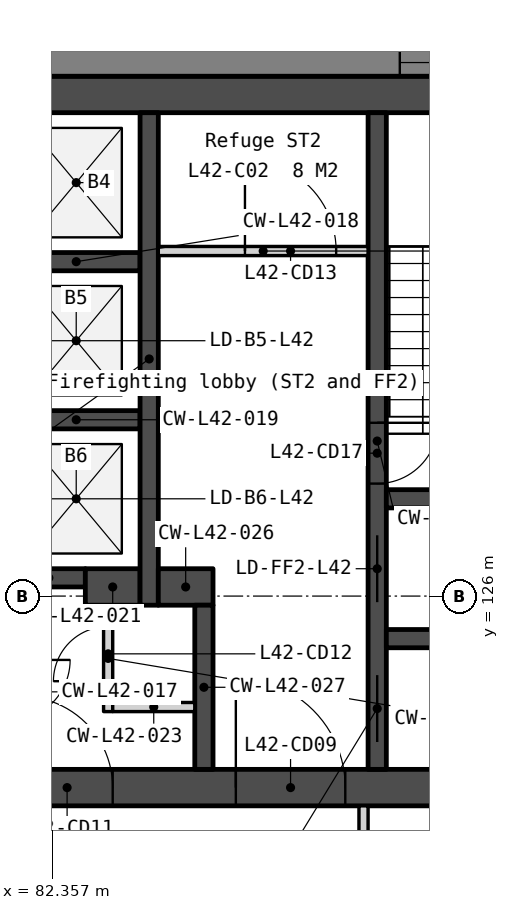
"""IFC4 building model, lengths in metres.
Left out: names, types, materials, properties, quantities, classifications, styles, units other than length and angle.
Written with IfcOpenShell. Run it as: python <this file> out.ifc"""

import sys

from ifc_helpers import new_model, si_unit, direction, frame, frame_2d, origin, place, context, subcontext, project, spatial, polyline, rectangle, outline, extrude, element, fill, save


model = new_model("IFC4")
c1 = context("Model", 3, precision=1e-05, world=origin(), true_north=direction((0.0, 1.0)))
c2 = subcontext(c1, "Body", "Model", "MODEL_VIEW")
j1 = project(units=[si_unit("LENGTHUNIT", "METRE"), si_unit("PLANEANGLEUNIT", "RADIAN")], contexts=[c1])
p1 = place(None, origin())
s1 = spatial("IfcSite", under=j1, at=p1, CompositionType="ELEMENT")
p2 = place(p1, origin())
s2 = spatial("IfcBuilding", under=s1, at=p2, CompositionType="ELEMENT")
p3 = place(p2, frame((0.0, 0.0, 167.6)))
s3 = spatial("IfcBuildingStorey", under=s2, at=p3, CompositionType="ELEMENT", Elevation=167.6)
p4 = place(p3, frame((69.0, 134.25, 0.0), z_axis=(0.0, 0.0, 1.0), x_axis=(1.0, 0.0, 0.0)))
e1 = element("IfcWall", 1, at=p4, inside=s3, PredefinedType="SOLIDWALL", context=c2, shape_type="SweptSolid", body=[
    extrude(rectangle(XDim=22.0, YDim=0.6, at=frame_2d((11.0, 0.0))), origin(), (0.0, 0.0, 1.0), 3.75),
])
p5 = place(p3, frame((69.0, 122.85, 0.0), z_axis=(0.0, 0.0, 1.0), x_axis=(1.0, 0.0, 0.0)))
e2 = element("IfcWall", 2, at=p5, inside=s3, PredefinedType="SOLIDWALL", context=c2, shape_type="SweptSolid", body=[
    extrude(rectangle(XDim=22.0, YDim=0.6, at=frame_2d((11.0, 0.0))), origin(), (0.0, 0.0, 1.0), 3.75),
])
p6 = place(p5, frame((16.375, 0.0, 0.0)))
e3 = element("IfcOpeningElement", 3, at=p6, cuts=e2, PredefinedType="OPENING", context=c2, shape_type="SweptSolid", body=[
    extrude(rectangle(XDim=1.8, YDim=2.1, at=frame_2d((0.9, 1.05))), frame((0.0, 0.31, 0.0), z_axis=(0.0, -1.0, 0.0), x_axis=(1.0, 0.0, 0.0)), (0.0, 0.0, 1.0), 0.62),
])
p7 = place(p5, frame((3.825, 0.0, 0.0)))
e4 = element("IfcOpeningElement", 4, at=p7, cuts=e2, PredefinedType="OPENING", context=c2, shape_type="SweptSolid", body=[
    extrude(rectangle(XDim=1.8, YDim=2.1, at=frame_2d((0.9, 1.05))), frame((0.0, 0.31, 0.0), z_axis=(0.0, -1.0, 0.0), x_axis=(1.0, 0.0, 0.0)), (0.0, 0.0, 1.0), 0.62),
])
p8 = place(p5, frame((12.85, 0.0, 0.0)))
e5 = element("IfcOpeningElement", 5, at=p8, cuts=e2, PredefinedType="OPENING", context=c2, shape_type="SweptSolid", body=[
    extrude(rectangle(XDim=1.5, YDim=2.1, at=frame_2d((0.75, 1.05))), frame((0.0, 0.31, 0.0), z_axis=(0.0, -1.0, 0.0), x_axis=(1.0, 0.0, 0.0)), (0.0, 0.0, 1.0), 0.62),
])
for number, where, z_axis, x_axis in (
    (6, (81.7, 131.5, 0.0), (0.0, 0.0, 1.0), (1.0, 0.0, 0.0)),
    (7, (81.7, 128.9, 0.0), (0.0, 0.0, 1.0), (1.0, 0.0, 0.0)),
):
    element("IfcWall", number, at=place(p3, frame(where, z_axis=z_axis, x_axis=x_axis)), inside=s3, PredefinedType="SOLIDWALL", context=c2, shape_type="SweptSolid", body=[
        extrude(rectangle(XDim=2.1, YDim=0.3, at=frame_2d((1.05, 0.0))), origin(), (0.0, 0.0, 1.0), 3.75),
    ])
p9 = place(p3, frame((81.7, 126.3, 0.0), z_axis=(0.0, 0.0, 1.0), x_axis=(1.0, 0.0, 0.0)))
e8 = element("IfcWall", 8, at=p9, inside=s3, PredefinedType="SOLIDWALL", context=c2, shape_type="SweptSolid", body=[
    extrude(rectangle(XDim=1.2, YDim=0.3, at=frame_2d((0.6, 0.0))), origin(), (0.0, 0.0, 1.0), 3.75),
])
p10 = place(p3, frame((82.9, 126.15, 0.0), z_axis=(0.0, 0.0, 1.0), x_axis=(1.0, 0.0, 0.0)))
e9 = element("IfcWall", 9, at=p10, inside=s3, PredefinedType="SOLIDWALL", context=c2, shape_type="SweptSolid", body=[
    extrude(rectangle(XDim=0.9, YDim=0.6, at=frame_2d((0.45, 0.0))), origin(), (0.0, 0.0, 1.0), 3.75),
])
p11 = place(p3, frame((83.275, 125.85, 0.0), z_axis=(0.0, 0.0, 1.0), x_axis=(0.0, -1.0, 0.0)))
e10 = element("IfcWall", 10, at=p11, inside=s3, PredefinedType="PARTITIONING", context=c2, shape_type="SweptSolid", body=[
    extrude(rectangle(XDim=1.75, YDim=0.15, at=frame_2d((0.875, 0.0))), origin(), (0.0, 0.0, 1.0), 3.75),
])
p12 = place(p11, frame((0.35, 0.0, 0.0)))
e11 = element("IfcOpeningElement", 11, at=p12, cuts=e10, PredefinedType="OPENING", context=c2, shape_type="SweptSolid", body=[
    extrude(rectangle(XDim=0.9, YDim=2.1, at=frame_2d((0.45, 1.05))), frame((0.0, 0.085, 0.0), z_axis=(0.0, -1.0, 0.0), x_axis=(1.0, 0.0, 0.0)), (0.0, 0.0, 1.0), 0.17),
])
p13 = place(p3, frame((83.35, 124.175, 0.0), z_axis=(0.0, 0.0, 1.0), x_axis=(1.0, 0.0, 0.0)))
e12 = element("IfcWall", 12, at=p13, inside=s3, PredefinedType="PARTITIONING", context=c2, shape_type="SweptSolid", body=[
    extrude(rectangle(XDim=1.35, YDim=0.15, at=frame_2d((0.675, 0.0))), origin(), (0.0, 0.0, 1.0), 3.75),
])
p14 = place(p3, frame((83.95, 133.95, 0.0), z_axis=(0.0, 0.0, 1.0), x_axis=(0.0, -1.0, 0.0)))
e13 = element("IfcWall", 13, at=p14, inside=s3, PredefinedType="SOLIDWALL", context=c2, shape_type="SweptSolid", body=[
    extrude(rectangle(XDim=8.1, YDim=0.3, at=frame_2d((4.05, 0.0))), origin(), (0.0, 0.0, 1.0), 3.75),
])
p15 = place(p3, frame((84.1, 131.675, 0.0), z_axis=(0.0, 0.0, 1.0), x_axis=(1.0, 0.0, 0.0)))
e14 = element("IfcWall", 14, at=p15, inside=s3, PredefinedType="PARTITIONING", context=c2, shape_type="SweptSolid", body=[
    extrude(rectangle(XDim=3.45, YDim=0.15, at=frame_2d((1.725, 0.0))), origin(), (0.0, 0.0, 1.0), 3.75),
])
p16 = place(p15, frame((1.425, 0.0, 0.0)))
e15 = element("IfcOpeningElement", 15, at=p16, cuts=e14, PredefinedType="OPENING", context=c2, shape_type="SweptSolid", body=[
    extrude(rectangle(XDim=1.5, YDim=2.1, at=frame_2d((0.75, 1.05))), frame((0.0, 0.085, 0.0), z_axis=(0.0, -1.0, 0.0), x_axis=(1.0, 0.0, 0.0)), (0.0, 0.0, 1.0), 0.17),
])
p17 = place(p3, frame((84.1, 126.15, 0.0), z_axis=(0.0, 0.0, 1.0), x_axis=(1.0, 0.0, 0.0)))
e16 = element("IfcWall", 16, at=p17, inside=s3, PredefinedType="SOLIDWALL", context=c2, shape_type="SweptSolid", body=[
    extrude(rectangle(XDim=0.9, YDim=0.6, at=frame_2d((0.45, 0.0))), origin(), (0.0, 0.0, 1.0), 3.75),
])
p18 = place(p3, frame((84.85, 125.85, 0.0), z_axis=(0.0, 0.0, 1.0), x_axis=(0.0, -1.0, 0.0)))
e17 = element("IfcWall", 17, at=p18, inside=s3, PredefinedType="SOLIDWALL", context=c2, shape_type="SweptSolid", body=[
    extrude(rectangle(XDim=2.7, YDim=0.3, at=frame_2d((1.35, 0.0))), origin(), (0.0, 0.0, 1.0), 3.75),
])
p19 = place(p3, frame((87.7, 133.95, 0.0), z_axis=(0.0, 0.0, 1.0), x_axis=(0.0, -1.0, 0.0)))
e18 = element("IfcWall", 18, at=p19, inside=s3, PredefinedType="SOLIDWALL", context=c2, shape_type="SweptSolid", body=[
    extrude(rectangle(XDim=10.8, YDim=0.3, at=frame_2d((5.4, 0.0))), origin(), (0.0, 0.0, 1.0), 3.75),
])
p20 = place(p19, frame((6.95, 0.0, 0.0)))
e19 = element("IfcOpeningElement", 19, at=p20, cuts=e18, PredefinedType="OPENING", context=c2, shape_type="SweptSolid", body=[
    extrude(rectangle(XDim=1.1, YDim=2.1, at=frame_2d((0.55, 1.05))), frame((0.0, 0.16, 0.0), z_axis=(0.0, -1.0, 0.0), x_axis=(1.0, 0.0, 0.0)), (0.0, 0.0, 1.0), 0.32),
])
p21 = place(p19, frame((5.1, 0.0, 0.0)))
e20 = element("IfcOpeningElement", 20, at=p21, cuts=e18, PredefinedType="OPENING", context=c2, shape_type="SweptSolid", body=[
    extrude(rectangle(XDim=1.0, YDim=2.1, at=frame_2d((0.5, 1.05))), frame((0.0, 0.16, 0.0), z_axis=(0.0, -1.0, 0.0), x_axis=(1.0, 0.0, 0.0)), (0.0, 0.0, 1.0), 0.32),
])
p22 = place(p19, frame((9.25, 0.0, 0.0)))
e21 = element("IfcOpeningElement", 21, at=p22, cuts=e18, PredefinedType="OPENING", context=c2, shape_type="SweptSolid", body=[
    extrude(rectangle(XDim=1.1, YDim=2.1, at=frame_2d((0.55, 1.05))), frame((0.0, 0.16, 0.0), z_axis=(0.0, -1.0, 0.0), x_axis=(1.0, 0.0, 0.0)), (0.0, 0.0, 1.0), 0.32),
])
for number, where, z_axis, x_axis in (
    (22, (87.85, 127.6, 0.0), (0.0, 0.0, 1.0), (1.0, 0.0, 0.0)),
    (23, (87.85, 125.3, 0.0), (0.0, 0.0, 1.0), (1.0, 0.0, 0.0)),
):
    element("IfcWall", number, at=place(p3, frame(where, z_axis=z_axis, x_axis=x_axis)), inside=s3, PredefinedType="SOLIDWALL", context=c2, shape_type="SweptSolid", body=[
        extrude(rectangle(XDim=2.55, YDim=0.3, at=frame_2d((1.275, 0.0))), origin(), (0.0, 0.0, 1.0), 3.75),
    ])
p23 = place(p3, frame((100.243, 134.775, -0.15), z_axis=(0.0, 0.0, 1.0), x_axis=(-1.0, 0.0, 0.0)))
e24 = element("IfcWall", 24, at=p23, inside=s3, PredefinedType="SOLIDWALL", context=c2, shape_type="SweptSolid", body=[
    extrude(outline(polyline([(40.486, 0.0), (40.486, 3.9), (0.0, 3.9), (0.0, 0.0), (40.486, 0.0)])), frame((0.0, 0.225, 0.0), z_axis=(0.0, -1.0, 0.0), x_axis=(1.0, 0.0, 0.0)), (0.0, 0.0, 1.0), 0.45),
])
p24 = place(p23, frame((0.87, 0.0, 0.95)))
e25 = element("IfcOpeningElement", 25, at=p24, cuts=e24, PredefinedType="OPENING", context=c2, shape_type="SweptSolid", body=[
    extrude(rectangle(XDim=1.2, YDim=2.2, at=frame_2d((0.6, 1.1))), frame((0.0, 0.235, 0.0), z_axis=(0.0, -1.0, 0.0), x_axis=(1.0, 0.0, 0.0)), (0.0, 0.0, 1.0), 0.47),
])
p25 = place(p23, frame((8.072, 0.0, 0.95)))
e26 = element("IfcOpeningElement", 26, at=p25, cuts=e24, PredefinedType="OPENING", context=c2, shape_type="SweptSolid", body=[
    extrude(rectangle(XDim=1.8, YDim=2.2, at=frame_2d((0.9, 1.1))), frame((0.0, 0.235, 0.0), z_axis=(0.0, -1.0, 0.0), x_axis=(1.0, 0.0, 0.0)), (0.0, 0.0, 1.0), 0.47),
])
p26 = place(p23, frame((10.372, 0.0, 0.95)))
e27 = element("IfcOpeningElement", 27, at=p26, cuts=e24, PredefinedType="OPENING", context=c2, shape_type="SweptSolid", body=[
    extrude(rectangle(XDim=1.8, YDim=2.2, at=frame_2d((0.9, 1.1))), frame((0.0, 0.235, 0.0), z_axis=(0.0, -1.0, 0.0), x_axis=(1.0, 0.0, 0.0)), (0.0, 0.0, 1.0), 0.47),
])
p27 = place(p23, frame((18.193, 0.0, 0.95)))
e28 = element("IfcOpeningElement", 28, at=p27, cuts=e24, PredefinedType="OPENING", context=c2, shape_type="SweptSolid", body=[
    extrude(rectangle(XDim=1.8, YDim=2.2, at=frame_2d((0.9, 1.1))), frame((0.0, 0.235, 0.0), z_axis=(0.0, -1.0, 0.0), x_axis=(1.0, 0.0, 0.0)), (0.0, 0.0, 1.0), 0.47),
])
p28 = place(p23, frame((20.493, 0.0, 0.95)))
e29 = element("IfcOpeningElement", 29, at=p28, cuts=e24, PredefinedType="OPENING", context=c2, shape_type="SweptSolid", body=[
    extrude(rectangle(XDim=1.8, YDim=2.2, at=frame_2d((0.9, 1.1))), frame((0.0, 0.235, 0.0), z_axis=(0.0, -1.0, 0.0), x_axis=(1.0, 0.0, 0.0)), (0.0, 0.0, 1.0), 0.47),
])
p29 = place(p23, frame((28.315, 0.0, 0.95)))
e30 = element("IfcOpeningElement", 30, at=p29, cuts=e24, PredefinedType="OPENING", context=c2, shape_type="SweptSolid", body=[
    extrude(rectangle(XDim=1.8, YDim=2.2, at=frame_2d((0.9, 1.1))), frame((0.0, 0.235, 0.0), z_axis=(0.0, -1.0, 0.0), x_axis=(1.0, 0.0, 0.0)), (0.0, 0.0, 1.0), 0.47),
])
p30 = place(p23, frame((30.615, 0.0, 0.95)))
e31 = element("IfcOpeningElement", 31, at=p30, cuts=e24, PredefinedType="OPENING", context=c2, shape_type="SweptSolid", body=[
    extrude(rectangle(XDim=1.8, YDim=2.2, at=frame_2d((0.9, 1.1))), frame((0.0, 0.235, 0.0), z_axis=(0.0, -1.0, 0.0), x_axis=(1.0, 0.0, 0.0)), (0.0, 0.0, 1.0), 0.47),
])
p31 = place(p23, frame((38.417, 0.0, 0.95)))
e32 = element("IfcOpeningElement", 32, at=p31, cuts=e24, PredefinedType="OPENING", context=c2, shape_type="SweptSolid", body=[
    extrude(rectangle(XDim=1.2, YDim=2.2, at=frame_2d((0.6, 1.1))), frame((0.0, 0.235, 0.0), z_axis=(0.0, -1.0, 0.0), x_axis=(1.0, 0.0, 0.0)), (0.0, 0.0, 1.0), 0.47),
])
p32 = place(p3, frame((88.166, 106.564, -0.15), z_axis=(0.0, 0.0, 1.0), x_axis=(0.499995644604, 0.866027918359, 0.0)))
e33 = element("IfcWall", 33, at=p32, inside=s3, PredefinedType="SOLIDWALL", context=c2, shape_type="SweptSolid", body=[
    extrude(outline(polyline([(28.365, 3.9), (28.365, 0.0), (0.0, 0.0), (0.0, 3.9), (28.365, 3.9)])), frame((0.0, 0.225, 0.0), z_axis=(0.0, -1.0, 0.0), x_axis=(1.0, 0.0, 0.0)), (0.0, 0.0, 1.0), 0.45),
])
p33 = place(p32, frame((6.072, 0.0, 0.95)))
e34 = element("IfcOpeningElement", 34, at=p33, cuts=e33, PredefinedType="OPENING", context=c2, shape_type="SweptSolid", body=[
    extrude(rectangle(XDim=1.8, YDim=2.2, at=frame_2d((0.9, 1.1))), frame((0.0, 0.235, 0.0), z_axis=(0.0, -1.0, 0.0), x_axis=(1.0, 0.0, 0.0)), (0.0, 0.0, 1.0), 0.47),
])
p34 = place(p32, frame((8.372, 0.0, 0.95)))
e35 = element("IfcOpeningElement", 35, at=p34, cuts=e33, PredefinedType="OPENING", context=c2, shape_type="SweptSolid", body=[
    extrude(rectangle(XDim=1.8, YDim=2.2, at=frame_2d((0.9, 1.1))), frame((0.0, 0.235, 0.0), z_axis=(0.0, -1.0, 0.0), x_axis=(1.0, 0.0, 0.0)), (0.0, 0.0, 1.0), 0.47),
])
p35 = place(p32, frame((16.193, 0.0, 0.95)))
e36 = element("IfcOpeningElement", 36, at=p35, cuts=e33, PredefinedType="OPENING", context=c2, shape_type="SweptSolid", body=[
    extrude(rectangle(XDim=1.8, YDim=2.2, at=frame_2d((0.9, 1.1))), frame((0.0, 0.235, 0.0), z_axis=(0.0, -1.0, 0.0), x_axis=(1.0, 0.0, 0.0)), (0.0, 0.0, 1.0), 0.47),
])
p36 = place(p32, frame((18.493, 0.0, 0.95)))
e37 = element("IfcOpeningElement", 37, at=p36, cuts=e33, PredefinedType="OPENING", context=c2, shape_type="SweptSolid", body=[
    extrude(rectangle(XDim=1.8, YDim=2.2, at=frame_2d((0.9, 1.1))), frame((0.0, 0.235, 0.0), z_axis=(0.0, -1.0, 0.0), x_axis=(1.0, 0.0, 0.0)), (0.0, 0.0, 1.0), 0.47),
])
p37 = place(p32, frame((26.295, 0.0, 0.95)))
e38 = element("IfcOpeningElement", 38, at=p37, cuts=e33, PredefinedType="OPENING", context=c2, shape_type="SweptSolid", body=[
    extrude(rectangle(XDim=1.2, YDim=2.2, at=frame_2d((0.6, 1.1))), frame((0.0, 0.235, 0.0), z_axis=(0.0, -1.0, 0.0), x_axis=(1.0, 0.0, 0.0)), (0.0, 0.0, 1.0), 0.47),
])
p38 = place(p3, frame((87.475, 120.05, 0.0), z_axis=(0.0, 0.0, 1.0), x_axis=(0.0, 1.0, 0.0)))
e39 = element("IfcWall", 39, at=p38, inside=s3, PredefinedType="PARTITIONING", context=c2, shape_type="SweptSolid", body=[
    extrude(rectangle(XDim=2.5, YDim=0.15, at=frame_2d((1.25, 0.0))), origin(), (0.0, 0.0, 1.0), 3.75),
])
p39 = place(p38, frame((0.75, 0.0, 0.0)))
e40 = element("IfcOpeningElement", 40, at=p39, cuts=e39, PredefinedType="OPENING", context=c2, shape_type="SweptSolid", body=[
    extrude(rectangle(XDim=1.0, YDim=2.1, at=frame_2d((0.5, 1.05))), frame((0.0, 0.085, 0.0), z_axis=(0.0, -1.0, 0.0), x_axis=(1.0, 0.0, 0.0)), (0.0, 0.0, 1.0), 0.17),
])
p40 = place(p20, origin())
e41 = element("IfcDoor", 41, at=p40, inside=s3, OperationType="SLIDING_TO_LEFT", PredefinedType="DOOR", context=c2, shape_type="SweptSolid", body=[
    extrude(rectangle(XDim=1.1, YDim=2.1, at=frame_2d((0.55, 1.05))), frame((0.0, 0.025, 0.0), z_axis=(0.0, -1.0, 0.0), x_axis=(1.0, 0.0, 0.0)), (0.0, 0.0, 1.0), 0.05),
])
fill(e19, e41)
p41 = place(p6, origin())
e42 = element("IfcDoor", 42, at=p41, inside=s3, OperationType="DOUBLE_DOOR_DOUBLE_SWING", PredefinedType="DOOR", context=c2, shape_type="SweptSolid", body=[
    extrude(rectangle(XDim=1.8, YDim=2.1, at=frame_2d((0.9, 1.05))), frame((0.0, 0.025, 0.0), z_axis=(0.0, -1.0, 0.0), x_axis=(1.0, 0.0, 0.0)), (0.0, 0.0, 1.0), 0.05),
])
fill(e3, e42)
p42 = place(p8, origin())
e43 = element("IfcDoor", 43, at=p42, inside=s3, OperationType="DOUBLE_DOOR_DOUBLE_SWING", PredefinedType="DOOR", context=c2, shape_type="SweptSolid", body=[
    extrude(rectangle(XDim=1.5, YDim=2.1, at=frame_2d((0.75, 1.05))), frame((0.0, 0.025, 0.0), z_axis=(0.0, -1.0, 0.0), x_axis=(1.0, 0.0, 0.0)), (0.0, 0.0, 1.0), 0.05),
])
fill(e5, e43)
p43 = place(p12, origin())
e44 = element("IfcDoor", 44, at=p43, inside=s3, OperationType="SINGLE_SWING_RIGHT", PredefinedType="DOOR", context=c2, shape_type="SweptSolid", body=[
    extrude(rectangle(XDim=0.9, YDim=2.1, at=frame_2d((0.45, 1.05))), frame((0.0, 0.025, 0.0), z_axis=(0.0, -1.0, 0.0), x_axis=(1.0, 0.0, 0.0)), (0.0, 0.0, 1.0), 0.05),
])
fill(e11, e44)
p44 = place(p16, origin())
e45 = element("IfcDoor", 45, at=p44, inside=s3, OperationType="DOUBLE_DOOR_DOUBLE_SWING", PredefinedType="DOOR", context=c2, shape_type="SweptSolid", body=[
    extrude(rectangle(XDim=1.5, YDim=2.1, at=frame_2d((0.75, 1.05))), frame((0.0, 0.025, 0.0), z_axis=(0.0, -1.0, 0.0), x_axis=(1.0, 0.0, 0.0)), (0.0, 0.0, 1.0), 0.05),
])
fill(e15, e45)
p45 = place(p21, origin())
e46 = element("IfcDoor", 46, at=p45, inside=s3, OperationType="SINGLE_SWING_LEFT", PredefinedType="DOOR", context=c2, shape_type="SweptSolid", body=[
    extrude(rectangle(XDim=1.0, YDim=2.1, at=frame_2d((0.5, 1.05))), frame((0.0, 0.025, 0.0), z_axis=(0.0, -1.0, 0.0), x_axis=(1.0, 0.0, 0.0)), (0.0, 0.0, 1.0), 0.05),
])
fill(e20, e46)
p46 = place(p22, origin())
e47 = element("IfcDoor", 47, at=p46, inside=s3, OperationType="SLIDING_TO_LEFT", PredefinedType="DOOR", context=c2, shape_type="SweptSolid", body=[
    extrude(rectangle(XDim=1.1, YDim=2.1, at=frame_2d((0.55, 1.05))), frame((0.0, 0.025, 0.0), z_axis=(0.0, -1.0, 0.0), x_axis=(1.0, 0.0, 0.0)), (0.0, 0.0, 1.0), 0.05),
])
fill(e21, e47)
p47 = place(p26, origin())
e48 = element("IfcWindow", 48, at=p47, inside=s3, PartitioningType="SINGLE_PANEL", PredefinedType="WINDOW", context=c2, shape_type="SweptSolid", body=[
    extrude(rectangle(XDim=1.8, YDim=2.2, at=frame_2d((0.9, 1.1))), frame((0.0, 0.03, 0.0), z_axis=(0.0, -1.0, 0.0), x_axis=(1.0, 0.0, 0.0)), (0.0, 0.0, 1.0), 0.06),
])
fill(e27, e48)
save(model, sys.argv[1])
